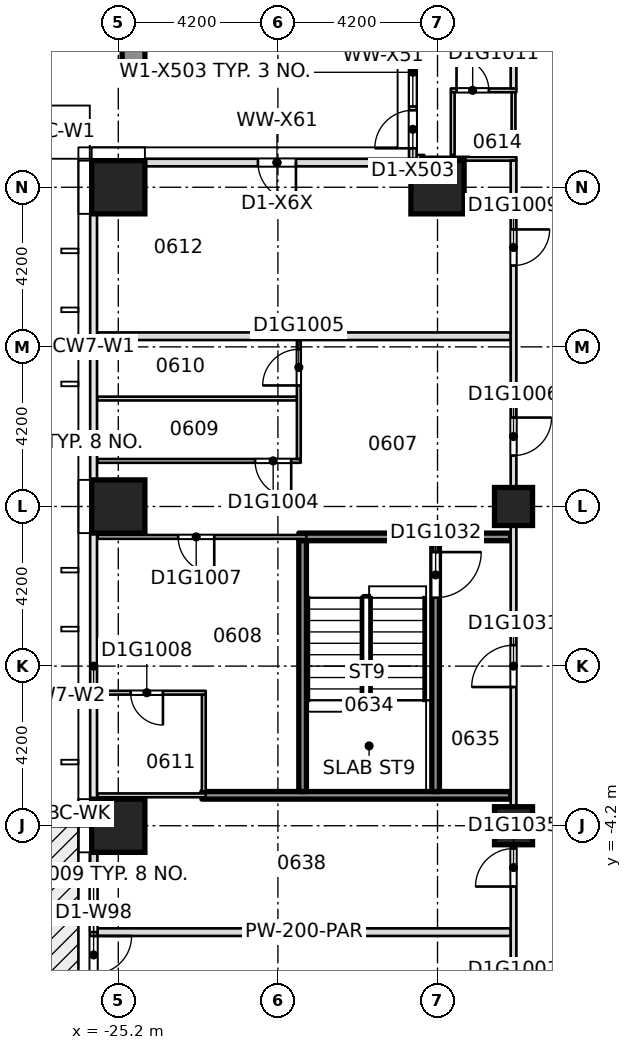
"""IFC4 building model, lengths in metres.
Left out: names, types, materials, properties, quantities, classifications, styles, units other than length and angle.
Written with IfcOpenShell. Run it as: python <this file> out.ifc"""

import sys

from ifc_helpers import new_model, si_unit, direction, frame, frame_2d, origin, origin_2d, place, context, subcontext, project, spatial, rectangle, extrude, element, fill, save


model = new_model("IFC4")
c1 = context("Model", 3, precision=1e-05, world=origin(), true_north=direction((0.0, 1.0)))
c2 = subcontext(c1, "Body", "Model", "MODEL_VIEW")
j1 = project(units=[si_unit("LENGTHUNIT", "METRE"), si_unit("PLANEANGLEUNIT", "RADIAN")], contexts=[c1])
p1 = place(None, origin())
s1 = spatial("IfcSite", under=j1, at=p1, CompositionType="ELEMENT")
p2 = place(p1, origin())
s2 = spatial("IfcBuilding", under=s1, at=p2, CompositionType="ELEMENT")
p3 = place(p2, frame((0.0, 0.0, 34.5)))
s3 = spatial("IfcBuildingStorey", under=s2, at=p3, CompositionType="ELEMENT", Elevation=34.5)
for number, where, z_axis, x_axis in (
    (1, (-25.2, -4.2, -0.32), (0.0, 0.0, 1.0), (1.0, 0.0, 0.0)),
    (2, (-25.2, 4.2, -0.32), (0.0, 0.0, 1.0), (1.0, 0.0, 0.0)),
    (3, (-25.2, 12.6, -0.32), (0.0, 0.0, 1.0), (1.0, 0.0, 0.0)),
    (4, (-16.8, 12.6, -0.32), (0.0, 0.0, 1.0), (1.0, 0.0, 0.0)),
):
    element("IfcColumn", number, at=place(p3, frame(where, z_axis=z_axis, x_axis=x_axis)), inside=s3, PredefinedType="COLUMN", context=c2, shape_type="SweptSolid", body=[
        extrude(rectangle(XDim=1.4, YDim=1.4, at=origin_2d()), origin(), (0.0, 0.0, 1.0), 3.45),
    ])
for number, where, z_axis, x_axis in (
    (5, (-14.8, -4.2, -0.32), (0.0, 0.0, 1.0), (1.0, 0.0, 0.0)),
    (6, (-14.8, 4.2, -0.32), (0.0, 0.0, 1.0), (1.0, 0.0, 0.0)),
):
    element("IfcColumn", number, at=place(p3, frame(where, z_axis=z_axis, x_axis=x_axis)), inside=s3, PredefinedType="COLUMN", context=c2, shape_type="SweptSolid", body=[
        extrude(rectangle(XDim=1.0, YDim=1.0, at=origin_2d()), origin(), (0.0, 0.0, 1.0), 3.45),
    ])
p4 = place(p3, frame((-25.75, -7.0, 0.0), z_axis=(0.0, 0.0, 1.0), x_axis=(1.0, 0.0, 0.0)))
e7 = element("IfcWall", 7, at=p4, inside=s3, PredefinedType="PARTITIONING", context=c2, shape_type="SweptSolid", body=[
    extrude(rectangle(XDim=10.875, YDim=0.2, at=frame_2d((5.438, 0.0))), origin(), (0.0, 0.0, 1.0), 3.13),
])
p5 = place(p3, frame((-25.75, -3.4, 0.0), z_axis=(0.0, 0.0, 1.0), x_axis=(1.0, 0.0, 0.0)))
e8 = element("IfcWall", 8, at=p5, inside=s3, PredefinedType="PARTITIONING", context=c2, shape_type="SweptSolid", body=[
    extrude(rectangle(XDim=2.85, YDim=0.1, at=frame_2d((1.425, 0.0))), origin(), (0.0, 0.0, 1.0), 3.13),
])
p6 = place(p3, frame((-23.0, -3.4, 0.0), z_axis=(0.0, 0.0, 1.0), x_axis=(1.0, 0.0, 0.0)))
e9 = element("IfcWall", 9, at=p6, inside=s3, PredefinedType="SOLIDWALL", context=c2, shape_type="SweptSolid", body=[
    extrude(rectangle(XDim=8.125, YDim=0.2, at=frame_2d((4.062, 0.0))), origin(), (0.0, 0.0, 1.0), 3.13),
])
p7 = place(p3, frame((-25.75, -0.7, 0.0), z_axis=(0.0, 0.0, 1.0), x_axis=(1.0, 0.0, 0.0)))
e10 = element("IfcWall", 10, at=p7, inside=s3, PredefinedType="PARTITIONING", context=c2, shape_type="SweptSolid", body=[
    extrude(rectangle(XDim=2.85, YDim=0.1, at=frame_2d((1.425, 0.0))), origin(), (0.0, 0.0, 1.0), 3.13),
])
p8 = place(p7, frame((0.875, 0.0, 0.0)))
e11 = element("IfcOpeningElement", 11, at=p8, cuts=e10, PredefinedType="OPENING", context=c2, shape_type="SweptSolid", body=[
    extrude(rectangle(XDim=0.85, YDim=2.1, at=frame_2d((0.425, 1.05))), frame((0.0, 0.06, 0.0), z_axis=(0.0, -1.0, 0.0), x_axis=(1.0, 0.0, 0.0)), (0.0, 0.0, 1.0), 0.12),
])
p9 = place(p3, frame((-25.75, 3.4, 0.0), z_axis=(0.0, 0.0, 1.0), x_axis=(1.0, 0.0, 0.0)))
e12 = element("IfcWall", 12, at=p9, inside=s3, PredefinedType="PARTITIONING", context=c2, shape_type="SweptSolid", body=[
    extrude(rectangle(XDim=5.5, YDim=0.1, at=frame_2d((2.75, 0.0))), origin(), (0.0, 0.0, 1.0), 3.13),
])
p10 = place(p9, frame((2.125, 0.0, 0.0)))
e13 = element("IfcOpeningElement", 13, at=p10, cuts=e12, PredefinedType="OPENING", context=c2, shape_type="SweptSolid", body=[
    extrude(rectangle(XDim=0.95, YDim=2.1, at=frame_2d((0.475, 1.05))), frame((0.0, 0.06, 0.0), z_axis=(0.0, -1.0, 0.0), x_axis=(1.0, 0.0, 0.0)), (0.0, 0.0, 1.0), 0.12),
])
p11 = place(p3, frame((-20.45, 3.4, 0.0), z_axis=(0.0, 0.0, 1.0), x_axis=(1.0, 0.0, 0.0)))
e14 = element("IfcWall", 14, at=p11, inside=s3, PredefinedType="SOLIDWALL", context=c2, shape_type="SweptSolid", body=[
    extrude(rectangle(XDim=5.575, YDim=0.2, at=frame_2d((2.788, 0.0))), origin(), (0.0, 0.0, 1.0), 3.13),
])
p12 = place(p3, frame((-25.75, 5.4, 0.0), z_axis=(0.0, 0.0, 1.0), x_axis=(1.0, 0.0, 0.0)))
e15 = element("IfcWall", 15, at=p12, inside=s3, PredefinedType="PARTITIONING", context=c2, shape_type="SweptSolid", body=[
    extrude(rectangle(XDim=5.35, YDim=0.1, at=frame_2d((2.675, 0.0))), origin(), (0.0, 0.0, 1.0), 3.13),
])
p13 = place(p12, frame((4.15, 0.0, 0.0)))
e16 = element("IfcOpeningElement", 16, at=p13, cuts=e15, PredefinedType="OPENING", context=c2, shape_type="SweptSolid", body=[
    extrude(rectangle(XDim=0.95, YDim=2.1, at=frame_2d((0.475, 1.05))), frame((0.0, 0.06, 0.0), z_axis=(0.0, -1.0, 0.0), x_axis=(1.0, 0.0, 0.0)), (0.0, 0.0, 1.0), 0.12),
])
p14 = place(p3, frame((-25.75, 7.04, 0.0), z_axis=(0.0, 0.0, 1.0), x_axis=(1.0, 0.0, 0.0)))
e17 = element("IfcWall", 17, at=p14, inside=s3, PredefinedType="PARTITIONING", context=c2, shape_type="SweptSolid", body=[
    extrude(rectangle(XDim=5.25, YDim=0.1, at=frame_2d((2.625, 0.0))), origin(), (0.0, 0.0, 1.0), 3.13),
])
p15 = place(p3, frame((-25.75, 8.68, 0.0), z_axis=(0.0, 0.0, 1.0), x_axis=(1.0, 0.0, 0.0)))
e18 = element("IfcWall", 18, at=p15, inside=s3, PredefinedType="PARTITIONING", context=c2, shape_type="SweptSolid", body=[
    extrude(rectangle(XDim=10.875, YDim=0.2, at=frame_2d((5.438, 0.0))), origin(), (0.0, 0.0, 1.0), 3.13),
])
p16 = place(p3, frame((-17.35, 13.35, 0.0), z_axis=(0.0, 0.0, 1.0), x_axis=(1.0, 0.0, 0.0)))
e19 = element("IfcWall", 19, at=p16, inside=s3, PredefinedType="PARTITIONING", context=c2, shape_type="SweptSolid", body=[
    extrude(rectangle(XDim=0.2, YDim=0.2, at=frame_2d((0.1, 0.0))), origin(), (0.0, 0.0, 1.0), 3.13),
])
p17 = place(p3, frame((-17.25, 13.35, 0.0), z_axis=(0.0, 0.0, 1.0), x_axis=(1.0, 0.0, 0.0)))
e20 = element("IfcWall", 20, at=p17, inside=s3, PredefinedType="PARTITIONING", context=c2, shape_type="SweptSolid", body=[
    extrude(rectangle(XDim=2.525, YDim=0.1, at=frame_2d((1.262, 0.0))), origin(), (0.0, 0.0, 1.0), 3.13),
])
p18 = place(p3, frame((-16.45, 15.15, 0.0), z_axis=(0.0, 0.0, 1.0), x_axis=(1.0, 0.0, 0.0)))
e21 = element("IfcWall", 21, at=p18, inside=s3, PredefinedType="PARTITIONING", context=c2, shape_type="SweptSolid", body=[
    extrude(rectangle(XDim=1.725, YDim=0.1, at=frame_2d((0.862, 0.0))), origin(), (0.0, 0.0, 1.0), 3.13),
])
p19 = place(p18, frame((0.15, 0.0, 0.0)))
e22 = element("IfcOpeningElement", 22, at=p19, cuts=e21, PredefinedType="OPENING", context=c2, shape_type="SweptSolid", body=[
    extrude(rectangle(XDim=0.85, YDim=2.1, at=frame_2d((0.425, 1.05))), frame((0.0, 0.06, 0.0), z_axis=(0.0, -1.0, 0.0), x_axis=(1.0, 0.0, 0.0)), (0.0, 0.0, 1.0), 0.12),
])
p20 = place(p3, frame((-22.95, -3.3, 0.0), z_axis=(0.0, 0.0, 1.0), x_axis=(0.0, 1.0, 0.0)))
e23 = element("IfcWall", 23, at=p20, inside=s3, PredefinedType="PARTITIONING", context=c2, shape_type="SweptSolid", body=[
    extrude(rectangle(XDim=2.55, YDim=0.1, at=frame_2d((1.275, 0.0))), origin(), (0.0, 0.0, 1.0), 3.13),
])
p21 = place(p3, frame((-20.45, 5.45, 0.0), z_axis=(0.0, 0.0, 1.0), x_axis=(0.0, 1.0, 0.0)))
e24 = element("IfcWall", 24, at=p21, inside=s3, PredefinedType="PARTITIONING", context=c2, shape_type="SweptSolid", body=[
    extrude(rectangle(XDim=3.13, YDim=0.1, at=frame_2d((1.565, 0.0))), origin(), (0.0, 0.0, 1.0), 3.13),
])
p22 = place(p21, frame((1.935, 0.0, 0.0)))
e25 = element("IfcOpeningElement", 25, at=p22, cuts=e24, PredefinedType="OPENING", context=c2, shape_type="SweptSolid", body=[
    extrude(rectangle(XDim=0.95, YDim=2.1, at=frame_2d((0.475, 1.05))), frame((0.0, 0.06, 0.0), z_axis=(0.0, -1.0, 0.0), x_axis=(1.0, 0.0, 0.0)), (0.0, 0.0, 1.0), 0.12),
])
p23 = place(p3, frame((-20.35, -3.3, 0.0), z_axis=(0.0, 0.0, 1.0), x_axis=(0.0, 1.0, 0.0)))
e26 = element("IfcWall", 26, at=p23, inside=s3, PredefinedType="SOLIDWALL", context=c2, shape_type="SweptSolid", body=[
    extrude(rectangle(XDim=6.6, YDim=0.2, at=frame_2d((3.3, 0.0))), origin(), (0.0, 0.0, 1.0), 3.13),
])
p24 = place(p3, frame((-16.4, 13.45, 0.0), z_axis=(0.0, 0.0, 1.0), x_axis=(0.0, 1.0, 0.0)))
e27 = element("IfcWall", 27, at=p24, inside=s3, PredefinedType="PARTITIONING", context=c2, shape_type="SweptSolid", body=[
    extrude(rectangle(XDim=1.65, YDim=0.1, at=frame_2d((0.825, 0.0))), origin(), (0.0, 0.0, 1.0), 3.13),
])
p25 = place(p3, frame((-16.85, -3.3, 0.0), z_axis=(0.0, 0.0, 1.0), x_axis=(0.0, 1.0, 0.0)))
e28 = element("IfcWall", 28, at=p25, inside=s3, PredefinedType="SOLIDWALL", context=c2, shape_type="SweptSolid", body=[
    extrude(rectangle(XDim=6.6, YDim=0.2, at=frame_2d((3.3, 0.0))), origin(), (0.0, 0.0, 1.0), 3.13),
])
p26 = place(p25, frame((5.1, 0.0, 0.0)))
e29 = element("IfcOpeningElement", 29, at=p26, cuts=e28, PredefinedType="OPENING", context=c2, shape_type="SweptSolid", body=[
    extrude(rectangle(XDim=1.2, YDim=2.1, at=frame_2d((0.6, 1.05))), frame((0.0, 0.11, 0.0), z_axis=(0.0, -1.0, 0.0), x_axis=(1.0, 0.0, 0.0)), (0.0, 0.0, 1.0), 0.22),
])
p27 = place(p3, frame((-14.8, -10.525, 0.0), z_axis=(0.0, 0.0, 1.0), x_axis=(0.0, 1.0, 0.0)))
e30 = element("IfcWall", 30, at=p27, inside=s3, PredefinedType="PARTITIONING", context=c2, shape_type="SweptSolid", body=[
    extrude(rectangle(XDim=23.825, YDim=0.15, at=frame_2d((11.913, 0.0))), origin(), (0.0, 0.0, 1.0), 3.13),
])
p28 = place(p27, frame((0.925, 0.0, 0.0)))
e31 = element("IfcOpeningElement", 31, at=p28, cuts=e30, PredefinedType="OPENING", context=c2, shape_type="SweptSolid", body=[
    extrude(rectangle(XDim=1.0, YDim=2.1, at=frame_2d((0.5, 1.05))), frame((0.0, 0.085, 0.0), z_axis=(0.0, -1.0, 0.0), x_axis=(1.0, 0.0, 0.0)), (0.0, 0.0, 1.0), 0.17),
])
p29 = place(p27, frame((16.065, 0.0, 0.0)))
e32 = element("IfcOpeningElement", 32, at=p29, cuts=e30, PredefinedType="OPENING", context=c2, shape_type="SweptSolid", body=[
    extrude(rectangle(XDim=1.0, YDim=2.1, at=frame_2d((0.5, 1.05))), frame((0.0, 0.085, 0.0), z_axis=(0.0, -1.0, 0.0), x_axis=(1.0, 0.0, 0.0)), (0.0, 0.0, 1.0), 0.17),
])
p30 = place(p27, frame((21.065, 0.0, 0.0)))
e33 = element("IfcOpeningElement", 33, at=p30, cuts=e30, PredefinedType="OPENING", context=c2, shape_type="SweptSolid", body=[
    extrude(rectangle(XDim=0.95, YDim=2.1, at=frame_2d((0.475, 1.05))), frame((0.0, 0.085, 0.0), z_axis=(0.0, -1.0, 0.0), x_axis=(1.0, 0.0, 0.0)), (0.0, 0.0, 1.0), 0.17),
])
p31 = place(p27, frame((9.975, 0.0, 0.0)))
e34 = element("IfcOpeningElement", 34, at=p31, cuts=e30, PredefinedType="OPENING", context=c2, shape_type="SweptSolid", body=[
    extrude(rectangle(XDim=1.1, YDim=2.1, at=frame_2d((0.55, 1.05))), frame((0.0, 0.085, 0.0), z_axis=(0.0, -1.0, 0.0), x_axis=(1.0, 0.0, 0.0)), (0.0, 0.0, 1.0), 0.17),
])
p32 = place(p27, frame((4.725, 0.0, 0.0)))
e35 = element("IfcOpeningElement", 35, at=p32, cuts=e30, PredefinedType="OPENING", context=c2, shape_type="SweptSolid", body=[
    extrude(rectangle(XDim=1.0, YDim=2.1, at=frame_2d((0.5, 1.05))), frame((0.0, 0.085, 0.0), z_axis=(0.0, -1.0, 0.0), x_axis=(1.0, 0.0, 0.0)), (0.0, 0.0, 1.0), 0.17),
])
p33 = place(p3, frame((-14.8, 13.4, 0.0), z_axis=(0.0, 0.0, 1.0), x_axis=(0.0, 1.0, 0.0)))
e36 = element("IfcWall", 36, at=p33, inside=s3, PredefinedType="PARTITIONING", context=c2, shape_type="SweptSolid", body=[
    extrude(rectangle(XDim=1.7, YDim=0.1, at=frame_2d((0.85, 0.0))), origin(), (0.0, 0.0, 1.0), 3.13),
])
p34 = place(p3, frame((-14.8, 15.2, 0.0), z_axis=(0.0, 0.0, 1.0), x_axis=(0.0, 1.0, 0.0)))
e37 = element("IfcWall", 37, at=p34, inside=s3, PredefinedType="PARTITIONING", context=c2, shape_type="SweptSolid", body=[
    extrude(rectangle(XDim=6.35, YDim=0.15, at=frame_2d((3.175, 0.0))), origin(), (0.0, 0.0, 1.0), 3.13),
])
p35 = place(p34, frame((2.475, 0.0, 0.0)))
e38 = element("IfcOpeningElement", 38, at=p35, cuts=e37, PredefinedType="OPENING", context=c2, shape_type="SweptSolid", body=[
    extrude(rectangle(XDim=0.95, YDim=2.1, at=frame_2d((0.475, 1.05))), frame((0.0, 0.085, 0.0), z_axis=(0.0, -1.0, 0.0), x_axis=(1.0, 0.0, 0.0)), (0.0, 0.0, 1.0), 0.17),
])
p36 = place(p3, frame((-17.45, 20.3, 0.0), z_axis=(0.0, 0.0, 1.0), x_axis=(0.0, -1.0, 0.0)))
e39 = element("IfcWall", 39, at=p36, inside=s3, PredefinedType="STANDARD", context=c2, shape_type="SweptSolid", body=[
    extrude(rectangle(XDim=6.95, YDim=0.2, at=frame_2d((3.475, 0.0))), origin(), (0.0, 0.0, 1.0), 3.13),
])
p37 = place(p36, frame((3.775, 0.0, 0.2)))
e40 = element("IfcOpeningElement", 40, at=p37, cuts=e39, PredefinedType="OPENING", context=c2, shape_type="SweptSolid", body=[
    extrude(rectangle(XDim=1.8, YDim=2.65, at=frame_2d((0.9, 1.325))), frame((0.0, 0.11, 0.0), z_axis=(0.0, -1.0, 0.0), x_axis=(1.0, 0.0, 0.0)), (0.0, 0.0, 1.0), 0.22),
])
p38 = place(p36, frame((5.675, 0.0, 0.0)))
e41 = element("IfcOpeningElement", 41, at=p38, cuts=e39, PredefinedType="OPENING", context=c2, shape_type="SweptSolid", body=[
    extrude(rectangle(XDim=1.0, YDim=2.4, at=frame_2d((0.5, 1.2))), frame((0.0, 0.11, 0.0), z_axis=(0.0, -1.0, 0.0), x_axis=(1.0, 0.0, 0.0)), (0.0, 0.0, 1.0), 0.22),
])
p39 = place(p36, frame((0.3, 0.0, 0.2)))
e42 = element("IfcOpeningElement", 42, at=p39, cuts=e39, PredefinedType="OPENING", context=c2, shape_type="SweptSolid", body=[
    extrude(rectangle(XDim=1.8, YDim=2.65, at=frame_2d((0.9, 1.325))), frame((0.0, 0.11, 0.0), z_axis=(0.0, -1.0, 0.0), x_axis=(1.0, 0.0, 0.0)), (0.0, 0.0, 1.0), 0.22),
])
p40 = place(p36, frame((2.2, 0.0, 0.0)))
e43 = element("IfcOpeningElement", 43, at=p40, cuts=e39, PredefinedType="OPENING", context=c2, shape_type="SweptSolid", body=[
    extrude(rectangle(XDim=1.0, YDim=2.4, at=frame_2d((0.5, 1.2))), frame((0.0, 0.11, 0.0), z_axis=(0.0, -1.0, 0.0), x_axis=(1.0, 0.0, 0.0)), (0.0, 0.0, 1.0), 0.22),
])
p41 = place(p3, frame((-17.55, 13.25, 0.0), z_axis=(0.0, 0.0, 1.0), x_axis=(-1.0, 0.0, 0.0)))
e44 = element("IfcWall", 44, at=p41, inside=s3, PredefinedType="STANDARD", context=c2, shape_type="SweptSolid", body=[
    extrude(rectangle(XDim=6.95, YDim=0.2, at=frame_2d((3.475, 0.0))), origin(), (0.0, 0.0, 1.0), 3.13),
])
p42 = place(p41, frame((2.975, 0.0, 0.0)))
e45 = element("IfcOpeningElement", 45, at=p42, cuts=e44, PredefinedType="OPENING", context=c2, shape_type="SweptSolid", body=[
    extrude(rectangle(XDim=1.0, YDim=2.4, at=frame_2d((0.5, 1.2))), frame((0.0, 0.11, 0.0), z_axis=(0.0, -1.0, 0.0), x_axis=(1.0, 0.0, 0.0)), (0.0, 0.0, 1.0), 0.22),
])
p43 = place(p3, frame((-25.85, -4.9, 0.0), z_axis=(0.0, 0.0, 1.0), x_axis=(0.0, -1.0, 0.0)))
e46 = element("IfcWall", 46, at=p43, inside=s3, PredefinedType="STANDARD", context=c2, shape_type="SweptSolid", body=[
    extrude(rectangle(XDim=7.0, YDim=0.2, at=frame_2d((3.5, 0.0))), origin(), (0.0, 0.0, 1.0), 3.13),
])
p44 = place(p43, frame((3.8, 0.0, 0.2)))
e47 = element("IfcOpeningElement", 47, at=p44, cuts=e46, PredefinedType="OPENING", context=c2, shape_type="SweptSolid", body=[
    extrude(rectangle(XDim=1.8, YDim=2.65, at=frame_2d((0.9, 1.325))), frame((0.0, 0.11, 0.0), z_axis=(0.0, -1.0, 0.0), x_axis=(1.0, 0.0, 0.0)), (0.0, 0.0, 1.0), 0.22),
])
p45 = place(p43, frame((5.7, 0.0, 0.0)))
e48 = element("IfcOpeningElement", 48, at=p45, cuts=e46, PredefinedType="OPENING", context=c2, shape_type="SweptSolid", body=[
    extrude(rectangle(XDim=1.0, YDim=2.4, at=frame_2d((0.5, 1.2))), frame((0.0, 0.11, 0.0), z_axis=(0.0, -1.0, 0.0), x_axis=(1.0, 0.0, 0.0)), (0.0, 0.0, 1.0), 0.22),
])
p46 = place(p43, frame((0.3, 0.0, 0.2)))
e49 = element("IfcOpeningElement", 49, at=p46, cuts=e46, PredefinedType="OPENING", context=c2, shape_type="SweptSolid", body=[
    extrude(rectangle(XDim=1.8, YDim=2.65, at=frame_2d((0.9, 1.325))), frame((0.0, 0.11, 0.0), z_axis=(0.0, -1.0, 0.0), x_axis=(1.0, 0.0, 0.0)), (0.0, 0.0, 1.0), 0.22),
])
p47 = place(p43, frame((2.2, 0.0, 0.0)))
e50 = element("IfcOpeningElement", 50, at=p47, cuts=e46, PredefinedType="OPENING", context=c2, shape_type="SweptSolid", body=[
    extrude(rectangle(XDim=1.0, YDim=2.4, at=frame_2d((0.5, 1.2))), frame((0.0, 0.11, 0.0), z_axis=(0.0, -1.0, 0.0), x_axis=(1.0, 0.0, 0.0)), (0.0, 0.0, 1.0), 0.22),
])
p48 = place(p3, frame((-24.8, 15.8, 0.0), z_axis=(0.0, 0.0, 1.0), x_axis=(0.0, 1.0, 0.0)))
e51 = element("IfcWall", 51, at=p48, inside=s3, PredefinedType="USERDEFINED", context=c2, shape_type="SweptSolid", body=[
    extrude(rectangle(XDim=6.0, YDim=0.6, at=frame_2d((3.0, 0.0))), origin(), (0.0, 0.0, 1.0), 1.0),
])
p49 = place(p13, origin())
e52 = element("IfcDoor", 52, at=p49, inside=s3, OperationType="SINGLE_SWING_LEFT", PredefinedType="DOOR", context=c2, shape_type="SweptSolid", body=[
    extrude(rectangle(XDim=0.95, YDim=2.1, at=frame_2d((0.475, 1.05))), frame((0.0, 0.025, 0.0), z_axis=(0.0, -1.0, 0.0), x_axis=(1.0, 0.0, 0.0)), (0.0, 0.0, 1.0), 0.05),
])
fill(e16, e52)
p50 = place(p22, origin())
e53 = element("IfcDoor", 53, at=p50, inside=s3, OperationType="SINGLE_SWING_RIGHT", PredefinedType="DOOR", context=c2, shape_type="SweptSolid", body=[
    extrude(rectangle(XDim=0.95, YDim=2.1, at=frame_2d((0.475, 1.05))), frame((0.0, 0.025, 0.0), z_axis=(0.0, -1.0, 0.0), x_axis=(1.0, 0.0, 0.0)), (0.0, 0.0, 1.0), 0.05),
])
fill(e25, e53)
p51 = place(p29, origin())
e54 = element("IfcDoor", 54, at=p51, inside=s3, OperationType="SINGLE_SWING_LEFT", PredefinedType="DOOR", context=c2, shape_type="SweptSolid", body=[
    extrude(rectangle(XDim=1.0, YDim=2.1, at=frame_2d((0.5, 1.05))), frame((0.0, 0.025, 0.0), z_axis=(0.0, -1.0, 0.0), x_axis=(1.0, 0.0, 0.0)), (0.0, 0.0, 1.0), 0.05),
])
fill(e32, e54)
p52 = place(p10, origin())
e55 = element("IfcDoor", 55, at=p52, inside=s3, OperationType="SINGLE_SWING_LEFT", PredefinedType="DOOR", context=c2, shape_type="SweptSolid", body=[
    extrude(rectangle(XDim=0.95, YDim=2.1, at=frame_2d((0.475, 1.05))), frame((0.0, 0.025, 0.0), z_axis=(0.0, -1.0, 0.0), x_axis=(1.0, 0.0, 0.0)), (0.0, 0.0, 1.0), 0.05),
])
fill(e13, e55)
p53 = place(p8, origin())
e56 = element("IfcDoor", 56, at=p53, inside=s3, OperationType="SINGLE_SWING_RIGHT", PredefinedType="DOOR", context=c2, shape_type="SweptSolid", body=[
    extrude(rectangle(XDim=0.85, YDim=2.1, at=frame_2d((0.425, 1.05))), frame((0.0, 0.025, 0.0), z_axis=(0.0, -1.0, 0.0), x_axis=(1.0, 0.0, 0.0)), (0.0, 0.0, 1.0), 0.05),
])
fill(e11, e56)
p54 = place(p30, origin())
e57 = element("IfcDoor", 57, at=p54, inside=s3, OperationType="SINGLE_SWING_RIGHT", PredefinedType="DOOR", context=c2, shape_type="SweptSolid", body=[
    extrude(rectangle(XDim=0.95, YDim=2.1, at=frame_2d((0.475, 1.05))), frame((0.0, 0.025, 0.0), z_axis=(0.0, -1.0, 0.0), x_axis=(1.0, 0.0, 0.0)), (0.0, 0.0, 1.0), 0.05),
])
fill(e33, e57)
p55 = place(p19, origin())
e58 = element("IfcDoor", 58, at=p55, inside=s3, OperationType="SINGLE_SWING_RIGHT", PredefinedType="DOOR", context=c2, shape_type="SweptSolid", body=[
    extrude(rectangle(XDim=0.85, YDim=2.1, at=frame_2d((0.425, 1.05))), frame((0.0, 0.025, 0.0), z_axis=(0.0, -1.0, 0.0), x_axis=(1.0, 0.0, 0.0)), (0.0, 0.0, 1.0), 0.05),
])
fill(e22, e58)
p56 = place(p31, origin())
e59 = element("IfcDoor", 59, at=p56, inside=s3, OperationType="SINGLE_SWING_RIGHT", PredefinedType="DOOR", context=c2, shape_type="SweptSolid", body=[
    extrude(rectangle(XDim=1.1, YDim=2.1, at=frame_2d((0.55, 1.05))), frame((0.0, 0.025, 0.0), z_axis=(0.0, -1.0, 0.0), x_axis=(1.0, 0.0, 0.0)), (0.0, 0.0, 1.0), 0.05),
])
fill(e34, e59)
p57 = place(p26, origin())
e60 = element("IfcDoor", 60, at=p57, inside=s3, OperationType="SINGLE_SWING_RIGHT", PredefinedType="DOOR", context=c2, shape_type="SweptSolid", body=[
    extrude(rectangle(XDim=1.2, YDim=2.1, at=frame_2d((0.6, 1.05))), frame((0.0, 0.025, 0.0), z_axis=(0.0, -1.0, 0.0), x_axis=(1.0, 0.0, 0.0)), (0.0, 0.0, 1.0), 0.05),
])
fill(e29, e60)
p58 = place(p32, origin())
e61 = element("IfcDoor", 61, at=p58, inside=s3, OperationType="SINGLE_SWING_LEFT", PredefinedType="DOOR", context=c2, shape_type="SweptSolid", body=[
    extrude(rectangle(XDim=1.0, YDim=2.1, at=frame_2d((0.5, 1.05))), frame((0.0, 0.025, 0.0), z_axis=(0.0, -1.0, 0.0), x_axis=(1.0, 0.0, 0.0)), (0.0, 0.0, 1.0), 0.05),
])
fill(e35, e61)
p59 = place(p37, origin())
e62 = element("IfcWindow", 62, at=p59, inside=s3, PartitioningType="SINGLE_PANEL", PredefinedType="WINDOW", context=c2, shape_type="SweptSolid", body=[
    extrude(rectangle(XDim=1.8, YDim=2.65, at=frame_2d((0.9, 1.325))), frame((0.0, 0.03, 0.0), z_axis=(0.0, -1.0, 0.0), x_axis=(1.0, 0.0, 0.0)), (0.0, 0.0, 1.0), 0.06),
])
fill(e40, e62)
p60 = place(p38, origin())
e63 = element("IfcDoor", 63, at=p60, inside=s3, OperationType="SINGLE_SWING_LEFT", PredefinedType="DOOR", context=c2, shape_type="SweptSolid", body=[
    extrude(rectangle(XDim=1.0, YDim=2.4, at=frame_2d((0.5, 1.2))), frame((0.0, 0.025, 0.0), z_axis=(0.0, -1.0, 0.0), x_axis=(1.0, 0.0, 0.0)), (0.0, 0.0, 1.0), 0.05),
])
fill(e41, e63)
p61 = place(p42, origin())
e64 = element("IfcDoor", 64, at=p61, inside=s3, OperationType="SINGLE_SWING_LEFT", PredefinedType="DOOR", context=c2, shape_type="SweptSolid", body=[
    extrude(rectangle(XDim=1.0, YDim=2.4, at=frame_2d((0.5, 1.2))), frame((0.0, 0.025, 0.0), z_axis=(0.0, -1.0, 0.0), x_axis=(1.0, 0.0, 0.0)), (0.0, 0.0, 1.0), 0.05),
])
fill(e45, e64)
p62 = place(p46, origin())
e65 = element("IfcWindow", 65, at=p62, inside=s3, PartitioningType="SINGLE_PANEL", PredefinedType="WINDOW", context=c2, shape_type="SweptSolid", body=[
    extrude(rectangle(XDim=1.8, YDim=2.65, at=frame_2d((0.9, 1.325))), frame((0.0, 0.03, 0.0), z_axis=(0.0, -1.0, 0.0), x_axis=(1.0, 0.0, 0.0)), (0.0, 0.0, 1.0), 0.06),
])
fill(e49, e65)
p63 = place(p47, origin())
e66 = element("IfcDoor", 66, at=p63, inside=s3, OperationType="SINGLE_SWING_LEFT", PredefinedType="DOOR", context=c2, shape_type="SweptSolid", body=[
    extrude(rectangle(XDim=1.0, YDim=2.4, at=frame_2d((0.5, 1.2))), frame((0.0, 0.025, 0.0), z_axis=(0.0, -1.0, 0.0), x_axis=(1.0, 0.0, 0.0)), (0.0, 0.0, 1.0), 0.05),
])
fill(e50, e66)
save(model, sys.argv[1])
